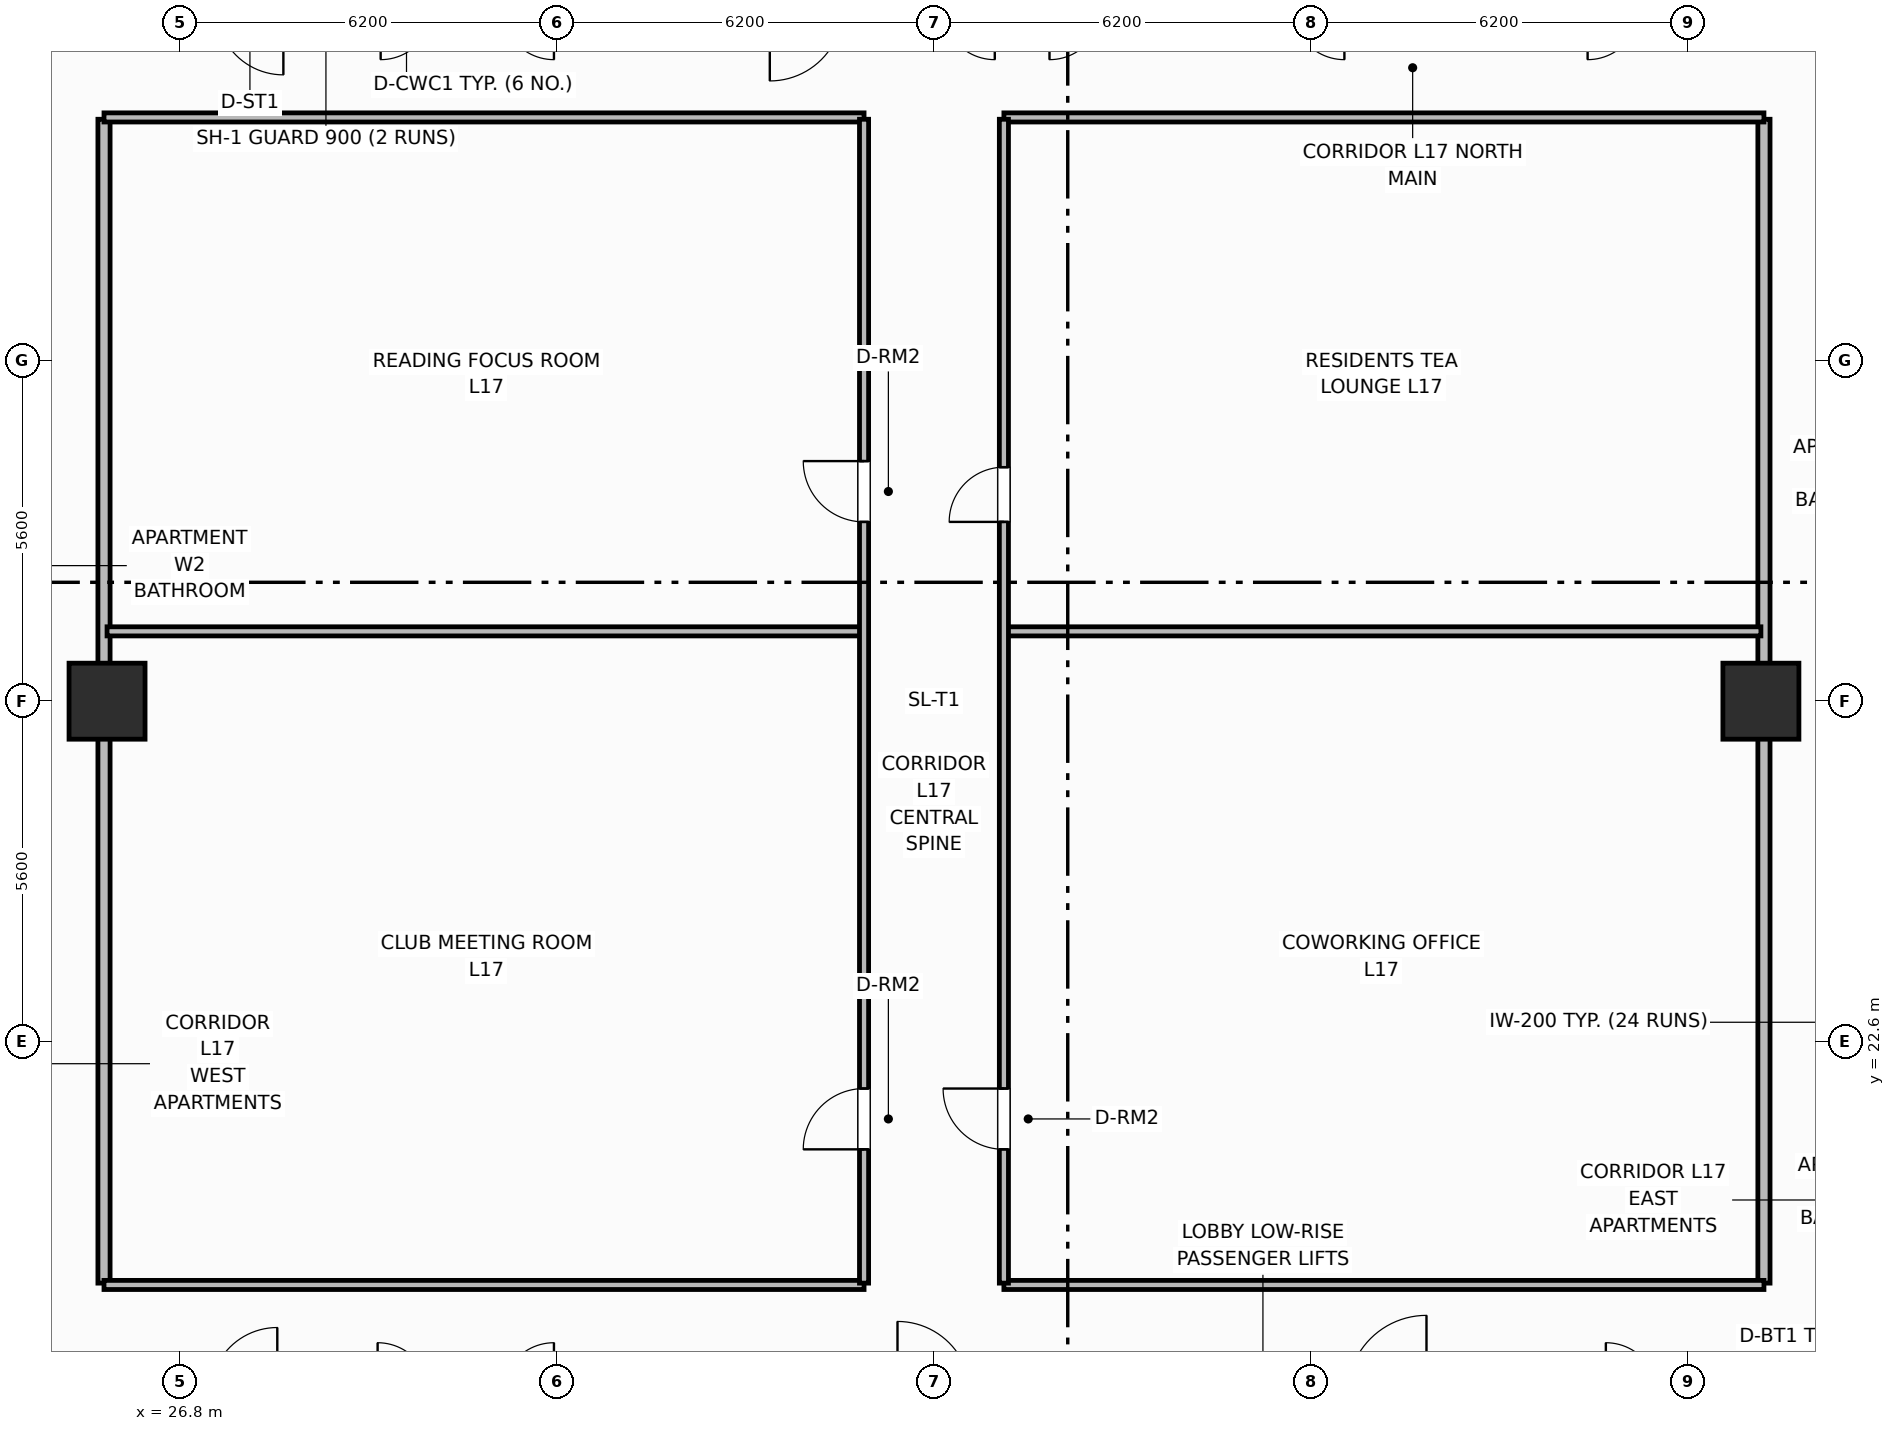
"""IFC4 building model, lengths in metres.
Left out: names, types, materials, properties, quantities, classifications, styles, units other than length and angle.
Written with IfcOpenShell. Run it as: python <this file> out.ifc"""

import sys

from ifc_helpers import new_model, si_unit, direction, frame, frame_2d, origin, origin_2d, place, context, subcontext, project, spatial, rectangle, extrude, element, fill, save


model = new_model("IFC4")
c1 = context("Model", 3, precision=1e-05, world=origin(), true_north=direction((0.0, 1.0)))
c2 = subcontext(c1, "Body", "Model", "MODEL_VIEW")
j1 = project(units=[si_unit("LENGTHUNIT", "METRE"), si_unit("PLANEANGLEUNIT", "RADIAN")], contexts=[c1])
p1 = place(None, origin())
s1 = spatial("IfcSite", under=j1, at=p1, CompositionType="ELEMENT")
p2 = place(p1, origin())
s2 = spatial("IfcBuilding", under=s1, at=p2, CompositionType="ELEMENT")
p3 = place(p2, frame((0.0, 0.0, 69.5)))
s3 = spatial("IfcBuildingStorey", under=s2, at=p3, CompositionType="ELEMENT", Elevation=69.5)
for number, where, z_axis, x_axis in (
    (1, (25.6, 28.2, 0.0), (0.0, 0.0, 1.0), (1.0, 0.0, 0.0)),
    (2, (52.8, 28.2, 0.0), (0.0, 0.0, 1.0), (1.0, 0.0, 0.0)),
):
    element("IfcColumn", number, at=place(p3, frame(where, z_axis=z_axis, x_axis=x_axis)), inside=s3, PredefinedType="COLUMN", context=c2, shape_type="SweptSolid", body=[
        extrude(rectangle(XDim=1.25, YDim=1.25, at=origin_2d()), origin(), (0.0, 0.0, 1.0), 3.7),
    ])
for number, where, z_axis, x_axis in (
    (3, (25.55, 18.63, 0.0), (0.0, 0.0, 1.0), (0.0, 1.0, 0.0)),
    (4, (52.85, 18.63, 0.0), (0.0, 0.0, 1.0), (0.0, 1.0, 0.0)),
):
    element("IfcWall", number, at=place(p3, frame(where, z_axis=z_axis, x_axis=x_axis)), inside=s3, PredefinedType="PARTITIONING", context=c2, shape_type="SweptSolid", body=[
        extrude(rectangle(XDim=19.14, YDim=0.2, at=frame_2d((9.57, 0.0))), origin(), (0.0, 0.0, 1.0), 2.53),
    ])
for number, where, z_axis, x_axis in (
    (5, (25.55, 18.6, 0.0), (0.0, 0.0, 1.0), (1.0, 0.0, 0.0)),
    (6, (40.35, 18.6, 0.0), (0.0, 0.0, 1.0), (1.0, 0.0, 0.0)),
    (7, (25.55, 37.8, 0.0), (0.0, 0.0, 1.0), (1.0, 0.0, 0.0)),
    (8, (40.35, 37.8, 0.0), (0.0, 0.0, 1.0), (1.0, 0.0, 0.0)),
):
    element("IfcWall", number, at=place(p3, frame(where, z_axis=z_axis, x_axis=x_axis)), inside=s3, PredefinedType="PARTITIONING", context=c2, shape_type="SweptSolid", body=[
        extrude(rectangle(XDim=12.5, YDim=0.15, at=frame_2d((6.25, 0.0))), origin(), (0.0, 0.0, 1.0), 2.53),
    ])
p4 = place(p3, frame((25.6, 29.348, 0.0), z_axis=(0.0, 0.0, 1.0), x_axis=(1.0, 0.0, 0.0)))
e9 = element("IfcWall", 9, at=p4, inside=s3, PredefinedType="PARTITIONING", context=c2, shape_type="SweptSolid", body=[
    extrude(rectangle(XDim=12.47, YDim=0.15, at=frame_2d((6.235, 0.0))), origin(), (0.0, 0.0, 1.0), 2.53),
])
p5 = place(p3, frame((40.38, 29.348, 0.0), z_axis=(0.0, 0.0, 1.0), x_axis=(1.0, 0.0, 0.0)))
e10 = element("IfcWall", 10, at=p5, inside=s3, PredefinedType="PARTITIONING", context=c2, shape_type="SweptSolid", body=[
    extrude(rectangle(XDim=12.42, YDim=0.15, at=frame_2d((6.21, 0.0))), origin(), (0.0, 0.0, 1.0), 2.53),
])
p6 = place(p3, frame((38.05, 18.63, 0.0), z_axis=(0.0, 0.0, 1.0), x_axis=(0.0, 1.0, 0.0)))
e11 = element("IfcWall", 11, at=p6, inside=s3, PredefinedType="PARTITIONING", context=c2, shape_type="SweptSolid", body=[
    extrude(rectangle(XDim=19.14, YDim=0.15, at=frame_2d((9.57, 0.0))), origin(), (0.0, 0.0, 1.0), 2.53),
])
p7 = place(p6, frame((2.2, 0.0, 0.0)))
e12 = element("IfcOpeningElement", 12, at=p7, cuts=e11, PredefinedType="OPENING", context=c2, shape_type="SweptSolid", body=[
    extrude(rectangle(XDim=1.0, YDim=2.15, at=frame_2d((0.5, 1.075))), frame((0.0, 0.085, 0.0), z_axis=(0.0, -1.0, 0.0), x_axis=(1.0, 0.0, 0.0)), (0.0, 0.0, 1.0), 0.17),
])
p8 = place(p6, frame((12.518, 0.0, 0.0)))
e13 = element("IfcOpeningElement", 13, at=p8, cuts=e11, PredefinedType="OPENING", context=c2, shape_type="SweptSolid", body=[
    extrude(rectangle(XDim=1.0, YDim=2.15, at=frame_2d((0.5, 1.075))), frame((0.0, 0.085, 0.0), z_axis=(0.0, -1.0, 0.0), x_axis=(1.0, 0.0, 0.0)), (0.0, 0.0, 1.0), 0.17),
])
p9 = place(p3, frame((40.35, 18.63, 0.0), z_axis=(0.0, 0.0, 1.0), x_axis=(0.0, 1.0, 0.0)))
e14 = element("IfcWall", 14, at=p9, inside=s3, PredefinedType="PARTITIONING", context=c2, shape_type="SweptSolid", body=[
    extrude(rectangle(XDim=19.14, YDim=0.15, at=frame_2d((9.57, 0.0))), origin(), (0.0, 0.0, 1.0), 2.53),
])
p10 = place(p9, frame((2.2, 0.0, 0.0)))
e15 = element("IfcOpeningElement", 15, at=p10, cuts=e14, PredefinedType="OPENING", context=c2, shape_type="SweptSolid", body=[
    extrude(rectangle(XDim=1.0, YDim=2.15, at=frame_2d((0.5, 1.075))), frame((0.0, 0.085, 0.0), z_axis=(0.0, -1.0, 0.0), x_axis=(1.0, 0.0, 0.0)), (0.0, 0.0, 1.0), 0.17),
])
p11 = place(p9, frame((12.518, 0.0, 0.0)))
e16 = element("IfcOpeningElement", 16, at=p11, cuts=e14, PredefinedType="OPENING", context=c2, shape_type="SweptSolid", body=[
    extrude(rectangle(XDim=0.9, YDim=2.1, at=frame_2d((0.45, 1.05))), frame((0.0, 0.085, 0.0), z_axis=(0.0, -1.0, 0.0), x_axis=(1.0, 0.0, 0.0)), (0.0, 0.0, 1.0), 0.17),
])
p12 = place(p7, origin())
e17 = element("IfcDoor", 17, at=p12, inside=s3, OperationType="SINGLE_SWING_LEFT", PredefinedType="DOOR", context=c2, shape_type="SweptSolid", body=[
    extrude(rectangle(XDim=1.0, YDim=2.15, at=frame_2d((0.5, 1.075))), frame((0.0, 0.025, 0.0), z_axis=(0.0, -1.0, 0.0), x_axis=(1.0, 0.0, 0.0)), (0.0, 0.0, 1.0), 0.05),
])
fill(e12, e17)
p13 = place(p8, origin())
e18 = element("IfcDoor", 18, at=p13, inside=s3, OperationType="SINGLE_SWING_RIGHT", PredefinedType="DOOR", context=c2, shape_type="SweptSolid", body=[
    extrude(rectangle(XDim=1.0, YDim=2.15, at=frame_2d((0.5, 1.075))), frame((0.0, 0.025, 0.0), z_axis=(0.0, -1.0, 0.0), x_axis=(1.0, 0.0, 0.0)), (0.0, 0.0, 1.0), 0.05),
])
fill(e13, e18)
p14 = place(p10, origin())
e19 = element("IfcDoor", 19, at=p14, inside=s3, OperationType="SINGLE_SWING_RIGHT", PredefinedType="DOOR", context=c2, shape_type="SweptSolid", body=[
    extrude(rectangle(XDim=1.0, YDim=2.15, at=frame_2d((0.5, 1.075))), frame((0.0, 0.025, 0.0), z_axis=(0.0, -1.0, 0.0), x_axis=(1.0, 0.0, 0.0)), (0.0, 0.0, 1.0), 0.05),
])
fill(e15, e19)
p15 = place(p11, origin())
e20 = element("IfcDoor", 20, at=p15, inside=s3, OperationType="SINGLE_SWING_LEFT", PredefinedType="DOOR", context=c2, shape_type="SweptSolid", body=[
    extrude(rectangle(XDim=0.9, YDim=2.1, at=frame_2d((0.45, 1.05))), frame((0.0, 0.025, 0.0), z_axis=(0.0, -1.0, 0.0), x_axis=(1.0, 0.0, 0.0)), (0.0, 0.0, 1.0), 0.05),
])
fill(e16, e20)
save(model, sys.argv[1])
